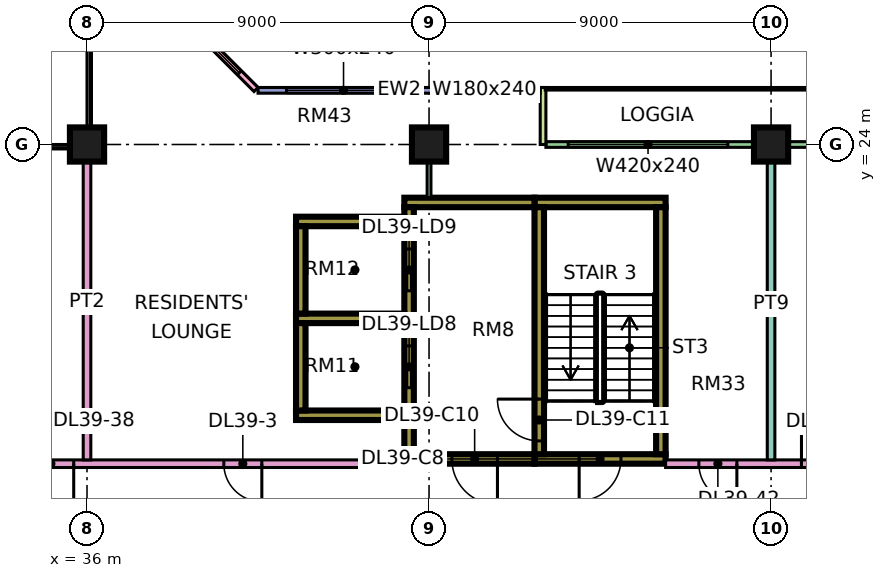
"""IFC4 building model, lengths in metres.
Left out: names, types, materials, properties, quantities, classifications, styles, units other than length and angle.
Written with IfcOpenShell. Run it as: python <this file> out.ifc"""

import sys

from ifc_helpers import new_model, si_unit, direction, frame, frame_2d, origin, origin_2d, place, context, subcontext, project, spatial, rectangle, extrude, element, fill, save


model = new_model("IFC4")
c1 = context("Model", 3, precision=1e-05, world=origin(), true_north=direction((0.0, 1.0)))
c2 = subcontext(c1, "Body", "Model", "MODEL_VIEW")
j1 = project(units=[si_unit("LENGTHUNIT", "METRE"), si_unit("PLANEANGLEUNIT", "RADIAN")], contexts=[c1])
p1 = place(None, origin())
s1 = spatial("IfcSite", under=j1, at=p1, CompositionType="ELEMENT")
p2 = place(p1, origin())
s2 = spatial("IfcBuilding", under=s1, at=p2, CompositionType="ELEMENT")
p3 = place(p2, frame((0.0, 0.0, 172.4)))
s3 = spatial("IfcBuildingStorey", under=s2, at=p3, CompositionType="ELEMENT", Elevation=172.4)
for number, where, z_axis, x_axis in (
    (1, (36.0, 24.0, 0.0), (0.0, 0.0, 1.0), (1.0, 0.0, 0.0)),
    (2, (45.0, 24.0, 0.0), (0.0, 0.0, 1.0), (1.0, 0.0, 0.0)),
    (3, (54.0, 24.0, 0.0), (0.0, 0.0, 1.0), (1.0, 0.0, 0.0)),
):
    element("IfcColumn", number, at=place(p3, frame(where, z_axis=z_axis, x_axis=x_axis)), inside=s3, PredefinedType="COLUMN", context=c2, shape_type="SweptSolid", body=[
        extrude(rectangle(XDim=0.9, YDim=0.9, at=origin_2d()), origin(), (0.0, 0.0, 1.0), 3.75),
    ])
p4 = place(p3, frame((47.775, 15.725, 0.0), z_axis=(0.0, 0.0, 1.0), x_axis=(1.0, 0.0, 0.0)))
e4 = element("IfcWall", 4, at=p4, inside=s3, PredefinedType="SHEAR", context=c2, shape_type="SweptSolid", body=[
    extrude(rectangle(XDim=3.45, YDim=0.25, at=frame_2d((1.725, 0.0))), origin(), (0.0, 0.0, 1.0), 3.75),
])
p5 = place(p4, frame((1.175, 0.0, 0.0)))
e5 = element("IfcOpeningElement", 5, at=p5, cuts=e4, PredefinedType="OPENING", context=c2, shape_type="SweptSolid", body=[
    extrude(rectangle(XDim=1.1, YDim=2.2, at=frame_2d((0.55, 1.1))), frame((0.0, 0.135, 0.0), z_axis=(0.0, -1.0, 0.0), x_axis=(1.0, 0.0, 0.0)), (0.0, 0.0, 1.0), 0.27),
])
p6 = place(p3, frame((47.775, 22.475, 0.0), z_axis=(0.0, 0.0, 1.0), x_axis=(1.0, 0.0, 0.0)))
e6 = element("IfcWall", 6, at=p6, inside=s3, PredefinedType="SHEAR", context=c2, shape_type="SweptSolid", body=[
    extrude(rectangle(XDim=3.45, YDim=0.25, at=frame_2d((1.725, 0.0))), origin(), (0.0, 0.0, 1.0), 3.75),
])
p7 = place(p3, frame((47.9, 15.85, 0.0), z_axis=(0.0, 0.0, 1.0), x_axis=(0.0, 1.0, 0.0)))
e7 = element("IfcWall", 7, at=p7, inside=s3, PredefinedType="SHEAR", context=c2, shape_type="SweptSolid", body=[
    extrude(rectangle(XDim=6.5, YDim=0.25, at=frame_2d((3.25, 0.0))), origin(), (0.0, 0.0, 1.0), 3.75),
])
p8 = place(p7, frame((0.35, 0.0, 0.0)))
e8 = element("IfcOpeningElement", 8, at=p8, cuts=e7, PredefinedType="OPENING", context=c2, shape_type="SweptSolid", body=[
    extrude(rectangle(XDim=1.1, YDim=2.2, at=frame_2d((0.55, 1.1))), frame((0.0, 0.135, 0.0), z_axis=(0.0, -1.0, 0.0), x_axis=(1.0, 0.0, 0.0)), (0.0, 0.0, 1.0), 0.27),
])
p9 = place(p3, frame((51.1, 15.85, 0.0), z_axis=(0.0, 0.0, 1.0), x_axis=(0.0, 1.0, 0.0)))
e9 = element("IfcWall", 9, at=p9, inside=s3, PredefinedType="SHEAR", context=c2, shape_type="SweptSolid", body=[
    extrude(rectangle(XDim=6.5, YDim=0.25, at=frame_2d((3.25, 0.0))), origin(), (0.0, 0.0, 1.0), 3.75),
])
p10 = place(p3, frame((44.35, 15.725, 0.0), z_axis=(0.0, 0.0, 1.0), x_axis=(1.0, 0.0, 0.0)))
e10 = element("IfcWall", 10, at=p10, inside=s3, PredefinedType="SHEAR", context=c2, shape_type="SweptSolid", body=[
    extrude(rectangle(XDim=3.425, YDim=0.25, at=frame_2d((1.712, 0.0))), origin(), (0.0, 0.0, 1.0), 3.75),
])
p11 = place(p10, frame((1.25, 0.0, 0.0)))
e11 = element("IfcOpeningElement", 11, at=p11, cuts=e10, PredefinedType="OPENING", context=c2, shape_type="SweptSolid", body=[
    extrude(rectangle(XDim=1.2, YDim=2.2, at=frame_2d((0.6, 1.1))), frame((0.0, 0.135, 0.0), z_axis=(0.0, -1.0, 0.0), x_axis=(1.0, 0.0, 0.0)), (0.0, 0.0, 1.0), 0.27),
])
p12 = place(p3, frame((44.35, 22.475, 0.0), z_axis=(0.0, 0.0, 1.0), x_axis=(1.0, 0.0, 0.0)))
e12 = element("IfcWall", 12, at=p12, inside=s3, PredefinedType="SHEAR", context=c2, shape_type="SweptSolid", body=[
    extrude(rectangle(XDim=3.425, YDim=0.25, at=frame_2d((1.712, 0.0))), origin(), (0.0, 0.0, 1.0), 3.75),
])
p13 = place(p3, frame((44.475, 15.85, 0.0), z_axis=(0.0, 0.0, 1.0), x_axis=(0.0, 1.0, 0.0)))
e13 = element("IfcWall", 13, at=p13, inside=s3, PredefinedType="SHEAR", context=c2, shape_type="SweptSolid", body=[
    extrude(rectangle(XDim=6.5, YDim=0.25, at=frame_2d((3.25, 0.0))), origin(), (0.0, 0.0, 1.0), 3.75),
])
p14 = place(p13, frame((1.75, 0.0, 0.0)))
e14 = element("IfcOpeningElement", 14, at=p14, cuts=e13, PredefinedType="OPENING", context=c2, shape_type="SweptSolid", body=[
    extrude(rectangle(XDim=1.1, YDim=2.2, at=frame_2d((0.55, 1.1))), frame((0.0, 0.135, 0.0), z_axis=(0.0, -1.0, 0.0), x_axis=(1.0, 0.0, 0.0)), (0.0, 0.0, 1.0), 0.27),
])
p15 = place(p13, frame((4.3, 0.0, 0.0)))
e15 = element("IfcOpeningElement", 15, at=p15, cuts=e13, PredefinedType="OPENING", context=c2, shape_type="SweptSolid", body=[
    extrude(rectangle(XDim=1.1, YDim=2.2, at=frame_2d((0.55, 1.1))), frame((0.0, 0.135, 0.0), z_axis=(0.0, -1.0, 0.0), x_axis=(1.0, 0.0, 0.0)), (0.0, 0.0, 1.0), 0.27),
])
for number, where, z_axis, x_axis in (
    (16, (41.5, 16.875, 0.0), (0.0, 0.0, 1.0), (1.0, 0.0, 0.0)),
    (17, (41.5, 19.425, 0.0), (0.0, 0.0, 1.0), (1.0, 0.0, 0.0)),
    (18, (41.5, 21.975, 0.0), (0.0, 0.0, 1.0), (1.0, 0.0, 0.0)),
):
    element("IfcWall", number, at=place(p3, frame(where, z_axis=z_axis, x_axis=x_axis)), inside=s3, PredefinedType="SHEAR", context=c2, shape_type="SweptSolid", body=[
        extrude(rectangle(XDim=2.85, YDim=0.25, at=frame_2d((1.425, 0.0))), origin(), (0.0, 0.0, 1.0), 3.75),
    ])
for number, where, z_axis, x_axis in (
    (19, (41.625, 17.0, 0.0), (0.0, 0.0, 1.0), (0.0, 1.0, 0.0)),
    (20, (41.625, 19.55, 0.0), (0.0, 0.0, 1.0), (0.0, 1.0, 0.0)),
):
    element("IfcWall", number, at=place(p3, frame(where, z_axis=z_axis, x_axis=x_axis)), inside=s3, PredefinedType="SHEAR", context=c2, shape_type="SweptSolid", body=[
        extrude(rectangle(XDim=2.3, YDim=0.25, at=frame_2d((1.15, 0.0))), origin(), (0.0, 0.0, 1.0), 3.75),
    ])
p16 = place(p3, frame((61.425, 24.0, 0.0), z_axis=(0.0, 0.0, 1.0), x_axis=(-1.0, 0.0, 0.0)))
e21 = element("IfcWall", 21, at=p16, inside=s3, PredefinedType="SOLIDWALL", context=c2, shape_type="SweptSolid", body=[
    extrude(rectangle(XDim=13.35, YDim=0.15, at=frame_2d((6.675, 0.0))), origin(), (0.0, 0.0, 1.0), 3.35),
])
p17 = place(p16, frame((0.262, 0.0, 0.45)))
e22 = element("IfcOpeningElement", 22, at=p17, cuts=e21, PredefinedType="OPENING", context=c2, shape_type="SweptSolid", body=[
    extrude(rectangle(XDim=0.9, YDim=2.4, at=frame_2d((0.45, 1.2))), frame((0.0, 0.085, 0.0), z_axis=(0.0, -1.0, 0.0), x_axis=(1.0, 0.0, 0.0)), (0.0, 0.0, 1.0), 0.17),
])
p18 = place(p16, frame((3.25, 0.0, 0.0)))
e23 = element("IfcOpeningElement", 23, at=p18, cuts=e21, PredefinedType="OPENING", context=c2, shape_type="SweptSolid", body=[
    extrude(rectangle(XDim=1.8, YDim=2.4, at=frame_2d((0.9, 1.2))), frame((0.0, 0.085, 0.0), z_axis=(0.0, -1.0, 0.0), x_axis=(1.0, 0.0, 0.0)), (0.0, 0.0, 1.0), 0.17),
])
p19 = place(p16, frame((8.562, 0.0, 0.45)))
e24 = element("IfcOpeningElement", 24, at=p19, cuts=e21, PredefinedType="OPENING", context=c2, shape_type="SweptSolid", body=[
    extrude(rectangle(XDim=4.2, YDim=2.4, at=frame_2d((2.1, 1.2))), frame((0.0, 0.085, 0.0), z_axis=(0.0, -1.0, 0.0), x_axis=(1.0, 0.0, 0.0)), (0.0, 0.0, 1.0), 0.17),
])
p20 = place(p3, frame((48.0, 25.5, 0.0), z_axis=(0.0, 0.0, 1.0), x_axis=(0.0, -1.0, 0.0)))
e25 = element("IfcWall", 25, at=p20, inside=s3, PredefinedType="SOLIDWALL", context=c2, shape_type="SweptSolid", body=[
    extrude(rectangle(XDim=1.5, YDim=0.15, at=frame_2d((0.75, 0.0))), origin(), (0.0, 0.0, 1.0), 3.35),
])
p21 = place(p3, frame((47.925, 25.425, 0.0), z_axis=(0.0, 0.0, 1.0), x_axis=(-1.0, 0.0, 0.0)))
e26 = element("IfcWall", 26, at=p21, inside=s3, PredefinedType="SOLIDWALL", context=c2, shape_type="SweptSolid", body=[
    extrude(rectangle(XDim=7.425, YDim=0.15, at=frame_2d((3.712, 0.0))), origin(), (0.0, 0.0, 1.0), 3.35),
])
p22 = place(p21, frame((0.562, 0.0, 0.45)))
e27 = element("IfcOpeningElement", 27, at=p22, cuts=e26, PredefinedType="OPENING", context=c2, shape_type="SweptSolid", body=[
    extrude(rectangle(XDim=1.8, YDim=2.4, at=frame_2d((0.9, 1.2))), frame((0.0, 0.085, 0.0), z_axis=(0.0, -1.0, 0.0), x_axis=(1.0, 0.0, 0.0)), (0.0, 0.0, 1.0), 0.17),
])
p23 = place(p21, frame((3.675, 0.0, 0.45)))
e28 = element("IfcOpeningElement", 28, at=p23, cuts=e26, PredefinedType="OPENING", context=c2, shape_type="SweptSolid", body=[
    extrude(rectangle(XDim=3.0, YDim=2.4, at=frame_2d((1.5, 1.2))), frame((0.0, 0.085, 0.0), z_axis=(0.0, -1.0, 0.0), x_axis=(1.0, 0.0, 0.0)), (0.0, 0.0, 1.0), 0.17),
])
p24 = place(p3, frame((40.447, 25.447, 0.0), z_axis=(0.0, 0.0, 1.0), x_axis=(-0.707106781187, 0.707106781187, 0.0)))
e29 = element("IfcWall", 29, at=p24, inside=s3, PredefinedType="SOLIDWALL", context=c2, shape_type="SweptSolid", body=[
    extrude(rectangle(XDim=4.243, YDim=0.15, at=frame_2d((2.121, 0.0))), origin(), (0.0, 0.0, 1.0), 3.35),
])
p25 = place(p24, frame((0.621, 0.0, 0.45)))
e30 = element("IfcOpeningElement", 30, at=p25, cuts=e29, PredefinedType="OPENING", context=c2, shape_type="SweptSolid", body=[
    extrude(rectangle(XDim=3.0, YDim=2.4, at=frame_2d((1.5, 1.2))), frame((0.0, 0.085, 0.0), z_axis=(0.0, -1.0, 0.0), x_axis=(1.0, 0.0, 0.0)), (0.0, 0.0, 1.0), 0.17),
])
p26 = place(p3, frame((34.0, 15.6, 0.0), z_axis=(0.0, 0.0, 1.0), x_axis=(1.0, 0.0, 0.0)))
e31 = element("IfcWall", 31, at=p26, inside=s3, PredefinedType="PARTITIONING", context=c2, shape_type="SweptSolid", body=[
    extrude(rectangle(XDim=10.35, YDim=0.2, at=frame_2d((5.175, 0.0))), origin(), (0.0, 0.0, 1.0), 3.35),
])
p27 = place(p26, frame((5.6, 0.0, 0.0)))
e32 = element("IfcOpeningElement", 32, at=p27, cuts=e31, PredefinedType="OPENING", context=c2, shape_type="SweptSolid", body=[
    extrude(rectangle(XDim=1.0, YDim=2.1, at=frame_2d((0.5, 1.05))), frame((0.0, 0.11, 0.0), z_axis=(0.0, -1.0, 0.0), x_axis=(1.0, 0.0, 0.0)), (0.0, 0.0, 1.0), 0.22),
])
p28 = place(p26, frame((0.45, 0.0, 0.0)))
e33 = element("IfcOpeningElement", 33, at=p28, cuts=e31, PredefinedType="OPENING", context=c2, shape_type="SweptSolid", body=[
    extrude(rectangle(XDim=1.2, YDim=2.1, at=frame_2d((0.6, 1.05))), frame((0.0, 0.11, 0.0), z_axis=(0.0, -1.0, 0.0), x_axis=(1.0, 0.0, 0.0)), (0.0, 0.0, 1.0), 0.22),
])
p29 = place(p3, frame((36.0, 15.7, 0.0), z_axis=(0.0, 0.0, 1.0), x_axis=(0.0, 1.0, 0.0)))
e34 = element("IfcWall", 34, at=p29, inside=s3, PredefinedType="PARTITIONING", context=c2, shape_type="SweptSolid", body=[
    extrude(rectangle(XDim=8.3, YDim=0.2, at=frame_2d((4.15, 0.0))), origin(), (0.0, 0.0, 1.0), 3.35),
])
p30 = place(p3, frame((45.0, 22.6, 0.0), z_axis=(0.0, 0.0, 1.0), x_axis=(0.0, 1.0, 0.0)))
e35 = element("IfcWall", 35, at=p30, inside=s3, PredefinedType="PARTITIONING", context=c2, shape_type="SweptSolid", body=[
    extrude(rectangle(XDim=1.4, YDim=0.1, at=frame_2d((0.7, 0.0))), origin(), (0.0, 0.0, 1.0), 3.35),
])
p31 = place(p3, frame((51.225, 15.6, 0.0), z_axis=(0.0, 0.0, 1.0), x_axis=(1.0, 0.0, 0.0)))
e36 = element("IfcWall", 36, at=p31, inside=s3, PredefinedType="PARTITIONING", context=c2, shape_type="SweptSolid", body=[
    extrude(rectangle(XDim=13.125, YDim=0.2, at=frame_2d((6.562, 0.0))), origin(), (0.0, 0.0, 1.0), 3.35),
])
p32 = place(p31, frame((3.575, 0.0, 0.0)))
e37 = element("IfcOpeningElement", 37, at=p32, cuts=e36, PredefinedType="OPENING", context=c2, shape_type="SweptSolid", body=[
    extrude(rectangle(XDim=1.0, YDim=2.1, at=frame_2d((0.5, 1.05))), frame((0.0, 0.11, 0.0), z_axis=(0.0, -1.0, 0.0), x_axis=(1.0, 0.0, 0.0)), (0.0, 0.0, 1.0), 0.22),
])
p33 = place(p31, frame((0.875, 0.0, 0.0)))
e38 = element("IfcOpeningElement", 38, at=p33, cuts=e36, PredefinedType="OPENING", context=c2, shape_type="SweptSolid", body=[
    extrude(rectangle(XDim=1.0, YDim=2.1, at=frame_2d((0.5, 1.05))), frame((0.0, 0.11, 0.0), z_axis=(0.0, -1.0, 0.0), x_axis=(1.0, 0.0, 0.0)), (0.0, 0.0, 1.0), 0.22),
])
p34 = place(p3, frame((54.0, 15.7, 0.0), z_axis=(0.0, 0.0, 1.0), x_axis=(0.0, 1.0, 0.0)))
e39 = element("IfcWall", 39, at=p34, inside=s3, PredefinedType="PARTITIONING", context=c2, shape_type="SweptSolid", body=[
    extrude(rectangle(XDim=8.226, YDim=0.2, at=frame_2d((4.113, 0.0))), origin(), (0.0, 0.0, 1.0), 3.35),
])
p35 = place(p19, origin())
e40 = element("IfcWindow", 40, at=p35, inside=s3, PartitioningType="SINGLE_PANEL", PredefinedType="WINDOW", context=c2, shape_type="SweptSolid", body=[
    extrude(rectangle(XDim=4.2, YDim=2.4, at=frame_2d((2.1, 1.2))), frame((0.0, 0.03, 0.0), z_axis=(0.0, -1.0, 0.0), x_axis=(1.0, 0.0, 0.0)), (0.0, 0.0, 1.0), 0.06),
])
fill(e24, e40)
p36 = place(p22, origin())
e41 = element("IfcWindow", 41, at=p36, inside=s3, PartitioningType="SINGLE_PANEL", PredefinedType="WINDOW", context=c2, shape_type="SweptSolid", body=[
    extrude(rectangle(XDim=1.8, YDim=2.4, at=frame_2d((0.9, 1.2))), frame((0.0, 0.03, 0.0), z_axis=(0.0, -1.0, 0.0), x_axis=(1.0, 0.0, 0.0)), (0.0, 0.0, 1.0), 0.06),
])
fill(e27, e41)
p37 = place(p23, origin())
e42 = element("IfcWindow", 42, at=p37, inside=s3, PartitioningType="SINGLE_PANEL", PredefinedType="WINDOW", context=c2, shape_type="SweptSolid", body=[
    extrude(rectangle(XDim=3.0, YDim=2.4, at=frame_2d((1.5, 1.2))), frame((0.0, 0.03, 0.0), z_axis=(0.0, -1.0, 0.0), x_axis=(1.0, 0.0, 0.0)), (0.0, 0.0, 1.0), 0.06),
])
fill(e28, e42)
p38 = place(p25, origin())
e43 = element("IfcWindow", 43, at=p38, inside=s3, PartitioningType="SINGLE_PANEL", PredefinedType="WINDOW", context=c2, shape_type="SweptSolid", body=[
    extrude(rectangle(XDim=3.0, YDim=2.4, at=frame_2d((1.5, 1.2))), frame((0.0, 0.03, 0.0), z_axis=(0.0, -1.0, 0.0), x_axis=(1.0, 0.0, 0.0)), (0.0, 0.0, 1.0), 0.06),
])
fill(e30, e43)
p39 = place(p5, frame((1.1, 0.0, 0.0), z_axis=(0.0, 0.0, 1.0), x_axis=(-1.0, 0.0, 0.0)))
e44 = element("IfcDoor", 44, at=p39, inside=s3, OperationType="SINGLE_SWING_LEFT", PredefinedType="DOOR", context=c2, shape_type="SweptSolid", body=[
    extrude(rectangle(XDim=1.1, YDim=2.2, at=frame_2d((0.55, 1.1))), frame((0.0, 0.025, 0.0), z_axis=(0.0, -1.0, 0.0), x_axis=(1.0, 0.0, 0.0)), (0.0, 0.0, 1.0), 0.05),
])
fill(e5, e44)
p40 = place(p11, origin())
e45 = element("IfcDoor", 45, at=p40, inside=s3, OperationType="SINGLE_SWING_RIGHT", PredefinedType="DOOR", context=c2, shape_type="SweptSolid", body=[
    extrude(rectangle(XDim=1.2, YDim=2.2, at=frame_2d((0.6, 1.1))), frame((0.0, 0.025, 0.0), z_axis=(0.0, -1.0, 0.0), x_axis=(1.0, 0.0, 0.0)), (0.0, 0.0, 1.0), 0.05),
])
fill(e11, e45)
p41 = place(p8, frame((1.1, 0.0, 0.0), z_axis=(0.0, 0.0, 1.0), x_axis=(-1.0, 0.0, 0.0)))
e46 = element("IfcDoor", 46, at=p41, inside=s3, OperationType="SINGLE_SWING_RIGHT", PredefinedType="DOOR", context=c2, shape_type="SweptSolid", body=[
    extrude(rectangle(XDim=1.1, YDim=2.2, at=frame_2d((0.55, 1.1))), frame((0.0, 0.025, 0.0), z_axis=(0.0, -1.0, 0.0), x_axis=(1.0, 0.0, 0.0)), (0.0, 0.0, 1.0), 0.05),
])
fill(e8, e46)
p42 = place(p14, origin())
e47 = element("IfcDoor", 47, at=p42, inside=s3, OperationType="DOUBLE_DOOR_SLIDING", PredefinedType="DOOR", context=c2, shape_type="SweptSolid", body=[
    extrude(rectangle(XDim=1.1, YDim=2.2, at=frame_2d((0.55, 1.1))), frame((0.0, 0.025, 0.0), z_axis=(0.0, -1.0, 0.0), x_axis=(1.0, 0.0, 0.0)), (0.0, 0.0, 1.0), 0.05),
])
fill(e14, e47)
p43 = place(p15, origin())
e48 = element("IfcDoor", 48, at=p43, inside=s3, OperationType="DOUBLE_DOOR_SLIDING", PredefinedType="DOOR", context=c2, shape_type="SweptSolid", body=[
    extrude(rectangle(XDim=1.1, YDim=2.2, at=frame_2d((0.55, 1.1))), frame((0.0, 0.025, 0.0), z_axis=(0.0, -1.0, 0.0), x_axis=(1.0, 0.0, 0.0)), (0.0, 0.0, 1.0), 0.05),
])
fill(e15, e48)
p44 = place(p27, origin())
e49 = element("IfcDoor", 49, at=p44, inside=s3, OperationType="SINGLE_SWING_RIGHT", PredefinedType="DOOR", context=c2, shape_type="SweptSolid", body=[
    extrude(rectangle(XDim=1.0, YDim=2.1, at=frame_2d((0.5, 1.05))), frame((0.0, 0.025, 0.0), z_axis=(0.0, -1.0, 0.0), x_axis=(1.0, 0.0, 0.0)), (0.0, 0.0, 1.0), 0.05),
])
fill(e32, e49)
p45 = place(p32, origin())
e50 = element("IfcDoor", 50, at=p45, inside=s3, OperationType="SINGLE_SWING_LEFT", PredefinedType="DOOR", context=c2, shape_type="SweptSolid", body=[
    extrude(rectangle(XDim=1.0, YDim=2.1, at=frame_2d((0.5, 1.05))), frame((0.0, 0.025, 0.0), z_axis=(0.0, -1.0, 0.0), x_axis=(1.0, 0.0, 0.0)), (0.0, 0.0, 1.0), 0.05),
])
fill(e37, e50)
p46 = place(p28, origin())
e51 = element("IfcDoor", 51, at=p46, inside=s3, OperationType="SINGLE_SWING_RIGHT", PredefinedType="DOOR", context=c2, shape_type="SweptSolid", body=[
    extrude(rectangle(XDim=1.2, YDim=2.1, at=frame_2d((0.6, 1.05))), frame((0.0, 0.025, 0.0), z_axis=(0.0, -1.0, 0.0), x_axis=(1.0, 0.0, 0.0)), (0.0, 0.0, 1.0), 0.05),
])
fill(e33, e51)
p47 = place(p33, origin())
e52 = element("IfcDoor", 52, at=p47, inside=s3, OperationType="SINGLE_SWING_RIGHT", PredefinedType="DOOR", context=c2, shape_type="SweptSolid", body=[
    extrude(rectangle(XDim=1.0, YDim=2.1, at=frame_2d((0.5, 1.05))), frame((0.0, 0.025, 0.0), z_axis=(0.0, -1.0, 0.0), x_axis=(1.0, 0.0, 0.0)), (0.0, 0.0, 1.0), 0.05),
])
fill(e38, e52)
save(model, sys.argv[1])
